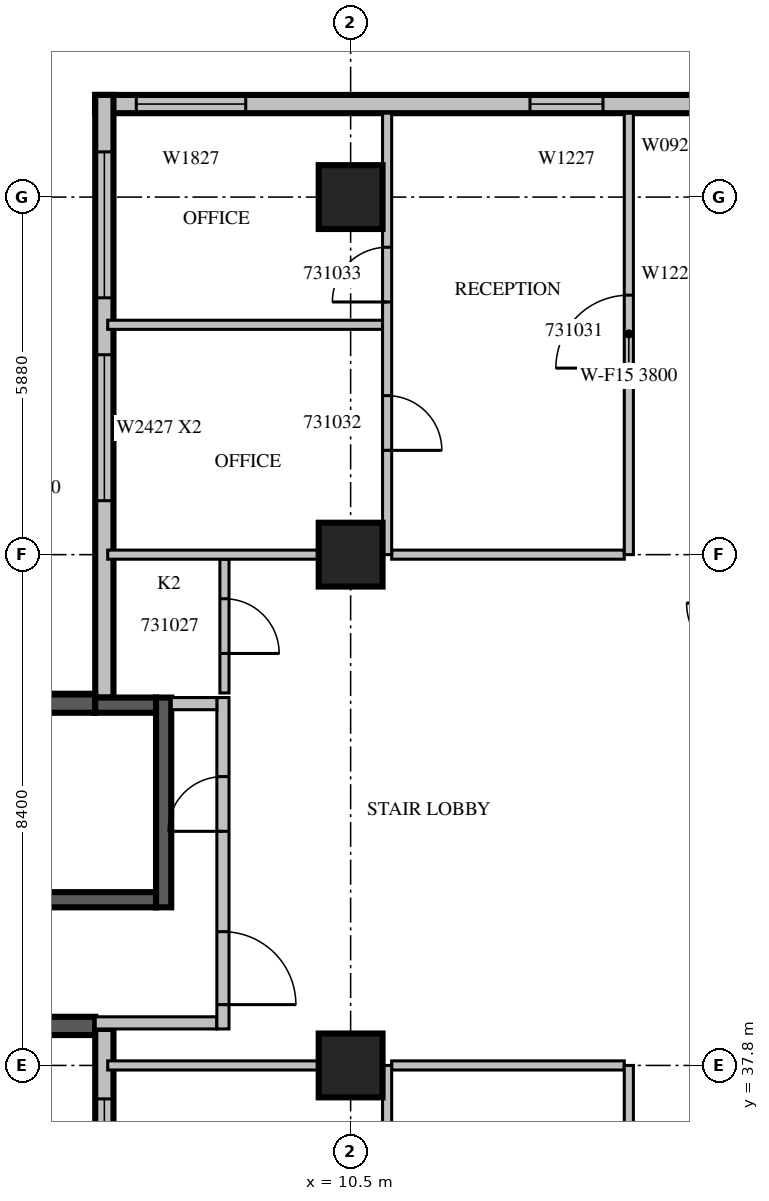
"""IFC4 building model, lengths in metres.
Left out: names, types, materials, properties, quantities, classifications, styles, units other than length and angle.
Written with IfcOpenShell. Run it as: python <this file> out.ifc"""

import sys

from ifc_helpers import new_model, si_unit, direction, frame, frame_2d, origin, origin_2d, place, context, subcontext, project, spatial, rectangle, extrude, source, transform, mapped, element, fill, save


model = new_model("IFC4")
c1 = context("Model", 3, precision=1e-05, world=origin(), true_north=direction((0.0, 1.0)))
c2 = subcontext(c1, "Body", "Model", "MODEL_VIEW")
j1 = project(units=[si_unit("LENGTHUNIT", "METRE"), si_unit("PLANEANGLEUNIT", "RADIAN")], contexts=[c1])
p1 = place(None, origin())
s1 = spatial("IfcSite", under=j1, at=p1, CompositionType="ELEMENT")
p2 = place(p1, origin())
s2 = spatial("IfcBuilding", under=s1, at=p2, CompositionType="ELEMENT")
p3 = place(p2, frame((0.0, 0.0, 141.3)))
s3 = spatial("IfcBuildingStorey", under=s2, at=p3, CompositionType="ELEMENT", Elevation=141.3)
m1 = source(origin(), c2, "Body", "SweptSolid", [
    extrude(rectangle(XDim=1.05, YDim=1.05, at=origin_2d()), origin(), (0.0, 0.0, 1.0), 4.2),
])
for number, where, z_axis, x_axis in (
    (1, (10.5, 37.8, 0.0), (0.0, 0.0, 1.0), (1.0, 0.0, 0.0)),
    (2, (10.5, 46.2, 0.0), (0.0, 0.0, 1.0), (1.0, 0.0, 0.0)),
    (3, (10.5, 52.08, 0.0), (0.0, 0.0, 1.0), (1.0, 0.0, 0.0)),
):
    element("IfcColumn", number, at=place(p3, frame(where, z_axis=z_axis, x_axis=x_axis)), inside=s3, PredefinedType="COLUMN", context=c2, shape_type="MappedRepresentation", body=[
        mapped(m1, transform((0.0, 0.0, 0.0), scale=1.0)),
    ])
m2 = source(origin(), c2, "Body", "SweptSolid", [
    extrude(rectangle(XDim=10.5, YDim=0.3, at=frame_2d((5.25, 0.0))), origin(), (0.0, 0.0, 1.0), 3.8),
])
p4 = place(p3, frame((16.8, 53.61, 0.0), z_axis=(0.0, 0.0, 1.0), x_axis=(-1.0, 0.0, 0.0)))
e4 = element("IfcWall", 4, at=p4, inside=s3, PredefinedType="STANDARD", context=c2, shape_type="MappedRepresentation", body=[
    mapped(m2, transform((0.0, 0.0, 0.0), scale=1.0)),
])
m3 = source(origin(), c2, "Body", "SweptSolid", [
    extrude(rectangle(XDim=1.2, YDim=2.7, at=frame_2d((0.6, 1.35))), frame((0.0, 0.16, 0.0), z_axis=(0.0, -1.0, 0.0), x_axis=(1.0, 0.0, 0.0)), (0.0, 0.0, 1.0), 0.32),
])
p5 = place(p4, frame((2.15, 0.0, 0.6)))
e5 = element("IfcOpeningElement", 5, at=p5, cuts=e4, PredefinedType="OPENING", context=c2, shape_type="MappedRepresentation", body=[
    mapped(m3, transform((0.0, 0.0, 0.0), scale=1.0)),
])
m4 = source(origin(), c2, "Body", "SweptSolid", [
    extrude(rectangle(XDim=1.8, YDim=2.7, at=frame_2d((0.9, 1.35))), frame((0.0, 0.16, 0.0), z_axis=(0.0, -1.0, 0.0), x_axis=(1.0, 0.0, 0.0)), (0.0, 0.0, 1.0), 0.32),
])
p6 = place(p4, frame((8.025, 0.0, 0.6)))
e6 = element("IfcOpeningElement", 6, at=p6, cuts=e4, PredefinedType="OPENING", context=c2, shape_type="MappedRepresentation", body=[
    mapped(m4, transform((0.0, 0.0, 0.0), scale=1.0)),
])
m5 = source(origin(), c2, "Body", "SweptSolid", [
    extrude(rectangle(XDim=9.91, YDim=0.3, at=frame_2d((4.955, 0.0))), origin(), (0.0, 0.0, 1.0), 3.8),
])
p7 = place(p3, frame((6.45, 53.76, 0.0), z_axis=(0.0, 0.0, 1.0), x_axis=(0.0, -1.0, 0.0)))
e7 = element("IfcWall", 7, at=p7, inside=s3, PredefinedType="STANDARD", context=c2, shape_type="MappedRepresentation", body=[
    mapped(m5, transform((0.0, 0.0, 0.0), scale=1.0)),
])
m6 = source(origin(), c2, "Body", "SweptSolid", [
    extrude(rectangle(XDim=2.4, YDim=2.7, at=frame_2d((1.2, 1.35))), frame((0.0, 0.16, 0.0), z_axis=(0.0, -1.0, 0.0), x_axis=(1.0, 0.0, 0.0)), (0.0, 0.0, 1.0), 0.32),
])
p8 = place(p7, frame((4.272, 0.0, 0.6)))
e8 = element("IfcOpeningElement", 8, at=p8, cuts=e7, PredefinedType="OPENING", context=c2, shape_type="MappedRepresentation", body=[
    mapped(m6, transform((0.0, 0.0, 0.0), scale=1.0)),
])
p9 = place(p7, frame((0.936, 0.0, 0.6)))
e9 = element("IfcOpeningElement", 9, at=p9, cuts=e7, PredefinedType="OPENING", context=c2, shape_type="MappedRepresentation", body=[
    mapped(m6, transform((0.0, 0.0, 0.0), scale=1.0)),
])
m7 = source(origin(), c2, "Body", "SweptSolid", [
    extrude(rectangle(XDim=6.1, YDim=0.3, at=frame_2d((3.05, 0.0))), origin(), (0.0, 0.0, 1.0), 3.8),
])
for number, where, z_axis, x_axis in (
    (10, (6.3, 43.75, 0.0), (0.0, 0.0, 1.0), (-1.0, 0.0, 0.0)),
    (11, (0.2, 38.45, 0.0), (0.0, 0.0, 1.0), (1.0, 0.0, 0.0)),
):
    element("IfcWall", number, at=place(p3, frame(where, z_axis=z_axis, x_axis=x_axis)), inside=s3, PredefinedType="SOLIDWALL", context=c2, shape_type="MappedRepresentation", body=[
        mapped(m7, transform((0.0, 0.0, 0.0), scale=1.0)),
    ])
m8 = source(origin(), c2, "Body", "SweptSolid", [
    extrude(rectangle(XDim=16.4, YDim=0.3, at=frame_2d((8.2, 0.0))), origin(), (0.0, 0.0, 1.0), 3.8),
])
p10 = place(p3, frame((6.45, 38.4, 0.0), z_axis=(0.0, 0.0, 1.0), x_axis=(0.0, -1.0, 0.0)))
e12 = element("IfcWall", 12, at=p10, inside=s3, PredefinedType="STANDARD", context=c2, shape_type="MappedRepresentation", body=[
    mapped(m8, transform((0.0, 0.0, 0.0), scale=1.0)),
])
p11 = place(p10, frame((1.15, 0.0, 0.6)))
e13 = element("IfcOpeningElement", 13, at=p11, cuts=e12, PredefinedType="OPENING", context=c2, shape_type="MappedRepresentation", body=[
    mapped(m4, transform((0.0, 0.0, 0.0), scale=1.0)),
])
p12 = place(p10, frame((9.438, 0.0, 0.6)))
e14 = element("IfcOpeningElement", 14, at=p12, cuts=e12, PredefinedType="OPENING", context=c2, shape_type="MappedRepresentation", body=[
    mapped(m4, transform((0.0, 0.0, 0.0), scale=1.0)),
])
p13 = place(p10, frame((12.912, 0.0, 0.6)))
e15 = element("IfcOpeningElement", 15, at=p13, cuts=e12, PredefinedType="OPENING", context=c2, shape_type="MappedRepresentation", body=[
    mapped(m3, transform((0.0, 0.0, 0.0), scale=1.0)),
])
m9 = source(origin(), c2, "Body", "SweptSolid", [
    extrude(rectangle(XDim=1.0, YDim=2.1, at=frame_2d((0.5, 1.05))), frame((0.0, 0.16, 0.0), z_axis=(0.0, -1.0, 0.0), x_axis=(1.0, 0.0, 0.0)), (0.0, 0.0, 1.0), 0.32),
])
p14 = place(p10, frame((5.908, 0.0, 0.0)))
e16 = element("IfcOpeningElement", 16, at=p14, cuts=e12, PredefinedType="OPENING", context=c2, shape_type="MappedRepresentation", body=[
    mapped(m9, transform((0.0, 0.0, 0.0), scale=1.0)),
])
m10 = source(origin(), c2, "Body", "SweptSolid", [
    extrude(rectangle(XDim=7.0, YDim=0.25, at=frame_2d((3.5, 0.0))), origin(), (0.0, 0.0, 1.0), 3.8),
])
p15 = place(p3, frame((0.3, 40.525, 0.0), z_axis=(0.0, 0.0, 1.0), x_axis=(1.0, 0.0, 0.0)))
e17 = element("IfcWall", 17, at=p15, inside=s3, PredefinedType="SOLIDWALL", context=c2, shape_type="MappedRepresentation", body=[
    mapped(m10, transform((0.0, 0.0, 0.0), scale=1.0)),
])
m11 = source(origin(), c2, "Body", "SweptSolid", [
    extrude(rectangle(XDim=1.1, YDim=2.1, at=frame_2d((0.55, 1.05))), frame((0.0, 0.135, 0.0), z_axis=(0.0, -1.0, 0.0), x_axis=(1.0, 0.0, 0.0)), (0.0, 0.0, 1.0), 0.27),
])
p16 = place(p15, frame((0.55, 0.0, 0.0)))
e18 = element("IfcOpeningElement", 18, at=p16, cuts=e17, PredefinedType="OPENING", context=c2, shape_type="MappedRepresentation", body=[
    mapped(m11, transform((0.0, 0.0, 0.0), scale=1.0)),
])
m12 = source(origin(), c2, "Body", "SweptSolid", [
    extrude(rectangle(XDim=1.0, YDim=0.25, at=frame_2d((0.5, 0.0))), origin(), (0.0, 0.0, 1.0), 3.8),
])
p17 = place(p3, frame((6.3, 43.725, 0.0), z_axis=(0.0, 0.0, 1.0), x_axis=(1.0, 0.0, 0.0)))
e19 = element("IfcWall", 19, at=p17, inside=s3, PredefinedType="SOLIDWALL", context=c2, shape_type="MappedRepresentation", body=[
    mapped(m12, transform((0.0, 0.0, 0.0), scale=1.0)),
])
m13 = source(origin(), c2, "Body", "SweptSolid", [
    extrude(rectangle(XDim=3.45, YDim=0.25, at=frame_2d((1.725, 0.0))), origin(), (0.0, 0.0, 1.0), 3.8),
])
p18 = place(p3, frame((7.425, 40.4, 0.0), z_axis=(0.0, 0.0, 1.0), x_axis=(0.0, 1.0, 0.0)))
e20 = element("IfcWall", 20, at=p18, inside=s3, PredefinedType="SOLIDWALL", context=c2, shape_type="MappedRepresentation", body=[
    mapped(m13, transform((0.0, 0.0, 0.0), scale=1.0)),
])
m14 = source(origin(), c2, "Body", "SweptSolid", [
    extrude(rectangle(XDim=2.0, YDim=0.2, at=frame_2d((1.0, 0.0))), origin(), (0.0, 0.0, 1.0), 3.8),
])
p19 = place(p3, frame((6.3, 38.5, 0.0), z_axis=(0.0, 0.0, 1.0), x_axis=(1.0, 0.0, 0.0)))
e21 = element("IfcWall", 21, at=p19, inside=s3, PredefinedType="PARTITIONING", context=c2, shape_type="MappedRepresentation", body=[
    mapped(m14, transform((0.0, 0.0, 0.0), scale=1.0)),
])
m15 = source(origin(), c2, "Body", "SweptSolid", [
    extrude(rectangle(XDim=5.45, YDim=0.2, at=frame_2d((2.725, 0.0))), origin(), (0.0, 0.0, 1.0), 3.8),
])
p20 = place(p3, frame((8.4, 38.4, 0.0), z_axis=(0.0, 0.0, 1.0), x_axis=(0.0, 1.0, 0.0)))
e22 = element("IfcWall", 22, at=p20, inside=s3, PredefinedType="PARTITIONING", context=c2, shape_type="MappedRepresentation", body=[
    mapped(m15, transform((0.0, 0.0, 0.0), scale=1.0)),
])
m16 = source(origin(), c2, "Body", "SweptSolid", [
    extrude(rectangle(XDim=1.2, YDim=2.1, at=frame_2d((0.6, 1.05))), frame((0.0, 0.11, 0.0), z_axis=(0.0, -1.0, 0.0), x_axis=(1.0, 0.0, 0.0)), (0.0, 0.0, 1.0), 0.22),
])
p21 = place(p20, frame((0.4, 0.0, 0.0)))
e23 = element("IfcOpeningElement", 23, at=p21, cuts=e22, PredefinedType="OPENING", context=c2, shape_type="MappedRepresentation", body=[
    mapped(m16, transform((0.0, 0.0, 0.0), scale=1.0)),
])
m17 = source(origin(), c2, "Body", "SweptSolid", [
    extrude(rectangle(XDim=0.9, YDim=2.1, at=frame_2d((0.45, 1.05))), frame((0.0, 0.11, 0.0), z_axis=(0.0, -1.0, 0.0), x_axis=(1.0, 0.0, 0.0)), (0.0, 0.0, 1.0), 0.22),
])
p22 = place(p20, frame((3.25, 0.0, 0.0)))
e24 = element("IfcOpeningElement", 24, at=p22, cuts=e22, PredefinedType="OPENING", context=c2, shape_type="MappedRepresentation", body=[
    mapped(m17, transform((0.0, 0.0, 0.0), scale=1.0)),
])
m18 = source(origin(), c2, "Body", "SweptSolid", [
    extrude(rectangle(XDim=0.75, YDim=0.2, at=frame_2d((0.375, 0.0))), origin(), (0.0, 0.0, 1.0), 3.8),
])
p23 = place(p3, frame((7.55, 43.75, 0.0), z_axis=(0.0, 0.0, 1.0), x_axis=(1.0, 0.0, 0.0)))
e25 = element("IfcWall", 25, at=p23, inside=s3, PredefinedType="PARTITIONING", context=c2, shape_type="MappedRepresentation", body=[
    mapped(m18, transform((0.0, 0.0, 0.0), scale=1.0)),
])
m19 = source(origin(), c2, "Body", "SweptSolid", [
    extrude(rectangle(XDim=2.2, YDim=0.15, at=frame_2d((1.1, 0.0))), origin(), (0.0, 0.0, 1.0), 3.8),
])
p24 = place(p3, frame((8.425, 43.925, 0.0), z_axis=(0.0, 0.0, 1.0), x_axis=(0.0, 1.0, 0.0)))
e26 = element("IfcWall", 26, at=p24, inside=s3, PredefinedType="PARTITIONING", context=c2, shape_type="MappedRepresentation", body=[
    mapped(m19, transform((0.0, 0.0, 0.0), scale=1.0)),
])
m20 = source(origin(), c2, "Body", "SweptSolid", [
    extrude(rectangle(XDim=0.9, YDim=2.1, at=frame_2d((0.45, 1.05))), frame((0.0, 0.085, 0.0), z_axis=(0.0, -1.0, 0.0), x_axis=(1.0, 0.0, 0.0)), (0.0, 0.0, 1.0), 0.17),
])
p25 = place(p24, frame((0.65, 0.0, 0.0)))
e27 = element("IfcOpeningElement", 27, at=p25, cuts=e26, PredefinedType="OPENING", context=c2, shape_type="MappedRepresentation", body=[
    mapped(m20, transform((0.0, 0.0, 0.0), scale=1.0)),
])
m21 = source(origin(), c2, "Body", "SweptSolid", [
    extrude(rectangle(XDim=3.471, YDim=0.15, at=frame_2d((1.736, 0.0))), origin(), (0.0, 0.0, 1.0), 3.8),
])
p26 = place(p3, frame((9.976, 37.8, 0.0), z_axis=(0.0, 0.0, 1.0), x_axis=(-1.0, 0.0, 0.0)))
e28 = element("IfcWall", 28, at=p26, inside=s3, PredefinedType="PARTITIONING", context=c2, shape_type="MappedRepresentation", body=[
    mapped(m21, transform((0.0, 0.0, 0.0), scale=1.0)),
])
m22 = source(origin(), c2, "Body", "SweptSolid", [
    extrude(rectangle(XDim=3.825, YDim=0.15, at=frame_2d((1.913, 0.0))), origin(), (0.0, 0.0, 1.0), 3.8),
])
p27 = place(p3, frame((15.0, 37.8, 0.0), z_axis=(0.0, 0.0, 1.0), x_axis=(-1.0, 0.0, 0.0)))
e29 = element("IfcWall", 29, at=p27, inside=s3, PredefinedType="PARTITIONING", context=c2, shape_type="MappedRepresentation", body=[
    mapped(m22, transform((0.0, 0.0, 0.0), scale=1.0)),
])
m23 = source(origin(), c2, "Body", "SweptSolid", [
    extrude(rectangle(XDim=8.4, YDim=0.15, at=frame_2d((4.2, 0.0))), origin(), (0.0, 0.0, 1.0), 3.3),
])
p28 = place(p3, frame((11.1, 29.4, 0.0), z_axis=(0.0, 0.0, 1.0), x_axis=(0.0, 1.0, 0.0)))
e30 = element("IfcWall", 30, at=p28, inside=s3, PredefinedType="PARTITIONING", context=c2, shape_type="MappedRepresentation", body=[
    mapped(m23, transform((0.0, 0.0, 0.0), scale=1.0)),
])
p29 = place(p28, frame((1.925, 0.0, 0.0)))
e31 = element("IfcOpeningElement", 31, at=p29, cuts=e30, PredefinedType="OPENING", context=c2, shape_type="MappedRepresentation", body=[
    mapped(m20, transform((0.0, 0.0, 0.0), scale=1.0)),
])
p30 = place(p28, frame((5.625, 0.0, 0.0)))
e32 = element("IfcOpeningElement", 32, at=p30, cuts=e30, PredefinedType="OPENING", context=c2, shape_type="MappedRepresentation", body=[
    mapped(m20, transform((0.0, 0.0, 0.0), scale=1.0)),
])
m24 = source(origin(), c2, "Body", "SweptSolid", [
    extrude(rectangle(XDim=4.52, YDim=0.15, at=frame_2d((2.26, 0.0))), origin(), (0.0, 0.0, 1.0), 3.8),
])
p31 = place(p3, frame((11.025, 49.98, 0.0), z_axis=(0.0, 0.0, 1.0), x_axis=(-1.0, 0.0, 0.0)))
e33 = element("IfcWall", 33, at=p31, inside=s3, PredefinedType="PARTITIONING", context=c2, shape_type="MappedRepresentation", body=[
    mapped(m24, transform((0.0, 0.0, 0.0), scale=1.0)),
])
p32 = place(p3, frame((9.976, 46.2, 0.0), z_axis=(0.0, 0.0, 1.0), x_axis=(-1.0, 0.0, 0.0)))
e34 = element("IfcWall", 34, at=p32, inside=s3, PredefinedType="PARTITIONING", context=c2, shape_type="MappedRepresentation", body=[
    mapped(m21, transform((0.0, 0.0, 0.0), scale=1.0)),
])
p33 = place(p3, frame((15.0, 46.2, 0.0), z_axis=(0.0, 0.0, 1.0), x_axis=(-1.0, 0.0, 0.0)))
e35 = element("IfcWall", 35, at=p33, inside=s3, PredefinedType="PARTITIONING", context=c2, shape_type="MappedRepresentation", body=[
    mapped(m22, transform((0.0, 0.0, 0.0), scale=1.0)),
])
m25 = source(origin(), c2, "Body", "SweptSolid", [
    extrude(rectangle(XDim=7.26, YDim=0.15, at=frame_2d((3.63, 0.0))), origin(), (0.0, 0.0, 1.0), 3.8),
])
p34 = place(p3, frame((11.1, 46.2, 0.0), z_axis=(0.0, 0.0, 1.0), x_axis=(0.0, 1.0, 0.0)))
e36 = element("IfcWall", 36, at=p34, inside=s3, PredefinedType="PARTITIONING", context=c2, shape_type="MappedRepresentation", body=[
    mapped(m25, transform((0.0, 0.0, 0.0), scale=1.0)),
])
p35 = place(p34, frame((1.715, 0.0, 0.0)))
e37 = element("IfcOpeningElement", 37, at=p35, cuts=e36, PredefinedType="OPENING", context=c2, shape_type="MappedRepresentation", body=[
    mapped(m20, transform((0.0, 0.0, 0.0), scale=1.0)),
])
p36 = place(p34, frame((4.155, 0.0, 0.0)))
e38 = element("IfcOpeningElement", 38, at=p36, cuts=e36, PredefinedType="OPENING", context=c2, shape_type="MappedRepresentation", body=[
    mapped(m20, transform((0.0, 0.0, 0.0), scale=1.0)),
])
p37 = place(p3, frame((15.075, 29.4, 0.0), z_axis=(0.0, 0.0, 1.0), x_axis=(0.0, 1.0, 0.0)))
e39 = element("IfcWall", 39, at=p37, inside=s3, PredefinedType="PARTITIONING", context=c2, shape_type="MappedRepresentation", body=[
    mapped(m23, transform((0.0, 0.0, 0.0), scale=1.0)),
])
m26 = source(origin(), c2, "Body", "SweptSolid", [
    extrude(rectangle(XDim=1.2, YDim=2.1, at=frame_2d((0.6, 1.05))), frame((0.0, 0.085, 0.0), z_axis=(0.0, -1.0, 0.0), x_axis=(1.0, 0.0, 0.0)), (0.0, 0.0, 1.0), 0.17),
])
p38 = place(p37, frame((3.6, 0.0, 0.0)))
e40 = element("IfcOpeningElement", 40, at=p38, cuts=e39, PredefinedType="OPENING", context=c2, shape_type="MappedRepresentation", body=[
    mapped(m26, transform((0.0, 0.0, 0.0), scale=1.0)),
])
p39 = place(p3, frame((15.075, 46.2, 0.0), z_axis=(0.0, 0.0, 1.0), x_axis=(0.0, 1.0, 0.0)))
e41 = element("IfcWall", 41, at=p39, inside=s3, PredefinedType="PARTITIONING", context=c2, shape_type="MappedRepresentation", body=[
    mapped(m25, transform((0.0, 0.0, 0.0), scale=1.0)),
])
p40 = place(p39, frame((3.067, 0.0, 0.0)))
e42 = element("IfcOpeningElement", 42, at=p40, cuts=e41, PredefinedType="OPENING", context=c2, shape_type="MappedRepresentation", body=[
    mapped(m26, transform((0.0, 0.0, 0.0), scale=1.0)),
])
m27 = source(origin(), c2, "Body", "SweptSolid", [
    extrude(rectangle(XDim=1.2, YDim=2.7, at=frame_2d((0.6, 1.35))), frame((0.0, 0.03, 0.0), z_axis=(0.0, -1.0, 0.0), x_axis=(1.0, 0.0, 0.0)), (0.0, 0.0, 1.0), 0.06),
])
p41 = place(p5, origin())
e43 = element("IfcWindow", 43, at=p41, inside=s3, PartitioningType="SINGLE_PANEL", PredefinedType="WINDOW", context=c2, shape_type="MappedRepresentation", body=[
    mapped(m27, transform((0.0, 0.0, 0.0), scale=1.0)),
])
fill(e5, e43)
m28 = source(origin(), c2, "Body", "SweptSolid", [
    extrude(rectangle(XDim=1.8, YDim=2.7, at=frame_2d((0.9, 1.35))), frame((0.0, 0.03, 0.0), z_axis=(0.0, -1.0, 0.0), x_axis=(1.0, 0.0, 0.0)), (0.0, 0.0, 1.0), 0.06),
])
p42 = place(p6, origin())
e44 = element("IfcWindow", 44, at=p42, inside=s3, PartitioningType="SINGLE_PANEL", PredefinedType="WINDOW", context=c2, shape_type="MappedRepresentation", body=[
    mapped(m28, transform((0.0, 0.0, 0.0), scale=1.0)),
])
fill(e6, e44)
m29 = source(origin(), c2, "Body", "SweptSolid", [
    extrude(rectangle(XDim=2.4, YDim=2.7, at=frame_2d((1.2, 1.35))), frame((0.0, 0.03, 0.0), z_axis=(0.0, -1.0, 0.0), x_axis=(1.0, 0.0, 0.0)), (0.0, 0.0, 1.0), 0.06),
])
p43 = place(p8, origin())
e45 = element("IfcWindow", 45, at=p43, inside=s3, PartitioningType="SINGLE_PANEL", PredefinedType="WINDOW", context=c2, shape_type="MappedRepresentation", body=[
    mapped(m29, transform((0.0, 0.0, 0.0), scale=1.0)),
])
fill(e8, e45)
p44 = place(p9, origin())
e46 = element("IfcWindow", 46, at=p44, inside=s3, PartitioningType="SINGLE_PANEL", PredefinedType="WINDOW", context=c2, shape_type="MappedRepresentation", body=[
    mapped(m29, transform((0.0, 0.0, 0.0), scale=1.0)),
])
fill(e9, e46)
p45 = place(p11, origin())
e47 = element("IfcWindow", 47, at=p45, inside=s3, PartitioningType="SINGLE_PANEL", PredefinedType="WINDOW", context=c2, shape_type="MappedRepresentation", body=[
    mapped(m28, transform((0.0, 0.0, 0.0), scale=1.0)),
])
fill(e13, e47)
m30 = source(origin(), c2, "Body", "SweptSolid", [
    extrude(rectangle(XDim=1.2, YDim=2.1, at=frame_2d((0.6, 1.05))), frame((0.0, 0.025, 0.0), z_axis=(0.0, -1.0, 0.0), x_axis=(1.0, 0.0, 0.0)), (0.0, 0.0, 1.0), 0.05),
])
p46 = place(p21, origin())
e48 = element("IfcDoor", 48, at=p46, inside=s3, OperationType="SINGLE_SWING_RIGHT", PredefinedType="DOOR", context=c2, shape_type="MappedRepresentation", body=[
    mapped(m30, transform((0.0, 0.0, 0.0), scale=1.0)),
])
fill(e23, e48)
m31 = source(origin(), c2, "Body", "SweptSolid", [
    extrude(rectangle(XDim=0.9, YDim=2.1, at=frame_2d((0.45, 1.05))), frame((0.0, 0.025, 0.0), z_axis=(0.0, -1.0, 0.0), x_axis=(1.0, 0.0, 0.0)), (0.0, 0.0, 1.0), 0.05),
])
p47 = place(p22, origin())
e49 = element("IfcDoor", 49, at=p47, inside=s3, OperationType="SINGLE_SWING_LEFT", PredefinedType="DOOR", context=c2, shape_type="MappedRepresentation", body=[
    mapped(m31, transform((0.0, 0.0, 0.0), scale=1.0)),
])
fill(e24, e49)
p48 = place(p25, origin())
e50 = element("IfcDoor", 50, at=p48, inside=s3, OperationType="SINGLE_SWING_RIGHT", PredefinedType="DOOR", context=c2, shape_type="MappedRepresentation", body=[
    mapped(m31, transform((0.0, 0.0, 0.0), scale=1.0)),
])
fill(e27, e50)
p49 = place(p40, origin())
e51 = element("IfcDoor", 51, at=p49, inside=s3, OperationType="SINGLE_SWING_LEFT", PredefinedType="DOOR", context=c2, shape_type="MappedRepresentation", body=[
    mapped(m30, transform((0.0, 0.0, 0.0), scale=1.0)),
])
fill(e42, e51)
p50 = place(p35, origin())
e52 = element("IfcDoor", 52, at=p50, inside=s3, OperationType="SINGLE_SWING_RIGHT", PredefinedType="DOOR", context=c2, shape_type="MappedRepresentation", body=[
    mapped(m31, transform((0.0, 0.0, 0.0), scale=1.0)),
])
fill(e37, e52)
p51 = place(p36, origin())
e53 = element("IfcDoor", 53, at=p51, inside=s3, OperationType="SINGLE_SWING_LEFT", PredefinedType="DOOR", context=c2, shape_type="MappedRepresentation", body=[
    mapped(m31, transform((0.0, 0.0, 0.0), scale=1.0)),
])
fill(e38, e53)
save(model, sys.argv[1])
